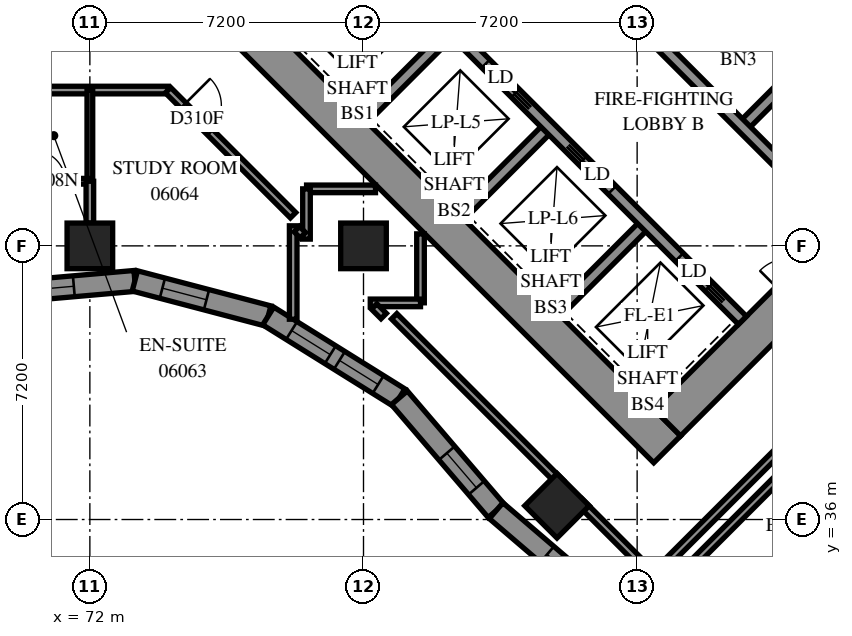
"""IFC4 building model, lengths in metres.
Left out: names, types, materials, properties, quantities, classifications, styles, units other than length and angle.
Written with IfcOpenShell. Run it as: python <this file> out.ifc"""

import sys

from ifc_helpers import new_model, si_unit, direction, frame, frame_2d, origin, origin_2d, place, context, subcontext, project, spatial, polyline, rectangle, outline, extrude, element, fill, save


model = new_model("IFC4")
c1 = context("Model", 3, precision=1e-05, world=origin(), true_north=direction((0.0, 1.0)))
c2 = subcontext(c1, "Body", "Model", "MODEL_VIEW")
j1 = project(units=[si_unit("LENGTHUNIT", "METRE"), si_unit("PLANEANGLEUNIT", "RADIAN")], contexts=[c1])
p1 = place(None, origin())
s1 = spatial("IfcSite", under=j1, at=p1, CompositionType="ELEMENT")
p2 = place(p1, origin())
s2 = spatial("IfcBuilding", under=s1, at=p2, CompositionType="ELEMENT")
p3 = place(p2, frame((0.0, 0.0, 27.0)))
s3 = spatial("IfcBuildingStorey", under=s2, at=p3, CompositionType="ELEMENT", Elevation=27.0)
for number, where, z_axis, x_axis in (
    (1, (72.0, 43.2, 0.0), (0.0, 0.0, 1.0), (1.0, 0.0, 0.0)),
    (2, (79.2, 43.2, 0.0), (0.0, 0.0, 1.0), (1.0, 0.0, 0.0)),
    (3, (84.291, 36.362, 0.0), (0.0, 0.0, 1.0), (0.707, -0.707, 0.0)),
):
    element("IfcColumn", number, at=place(p3, frame(where, z_axis=z_axis, x_axis=x_axis)), inside=s3, PredefinedType="COLUMN", context=c2, shape_type="SweptSolid", body=[
        extrude(rectangle(XDim=1.2, YDim=1.2, at=origin_2d()), origin(), (0.0, 0.0, 1.0), 3.1),
    ])
p4 = place(p3, frame((75.594, 49.443, -0.3), z_axis=(0.0, 0.0, 1.0), x_axis=(0.7071037324, -0.70710983, 0.0)))
e4 = element("IfcWall", 4, at=p4, inside=s3, PredefinedType="SHEAR", context=c2, shape_type="SweptSolid", body=[
    extrude(rectangle(XDim=16.4, YDim=1.0, at=frame_2d((8.2, 0.0))), origin(), (0.0, 0.0, 1.0), 2.7),
])
p5 = place(p3, frame((87.19, 38.554, -0.3), z_axis=(0.0, 0.0, 1.0), x_axis=(0.707103309, 0.7071102534, 0.0)))
e5 = element("IfcWall", 5, at=p5, inside=s3, PredefinedType="SHEAR", context=c2, shape_type="SweptSolid", body=[
    extrude(rectangle(XDim=14.4, YDim=1.0, at=frame_2d((7.2, 0.0))), origin(), (0.0, 0.0, 1.0), 2.7),
])
p6 = place(p5, frame((4.55, 0.0, 0.3)))
e6 = element("IfcOpeningElement", 6, at=p6, cuts=e5, PredefinedType="OPENING", context=c2, shape_type="SweptSolid", body=[
    extrude(rectangle(XDim=1.1, YDim=2.1, at=frame_2d((0.55, 1.05))), frame((0.0, 0.51, 0.0), z_axis=(0.0, -1.0, 0.0), x_axis=(1.0, 0.0, 0.0)), (0.0, 0.0, 1.0), 1.02),
])
p7 = place(p5, frame((11.35, 0.0, 0.3)))
e7 = element("IfcOpeningElement", 7, at=p7, cuts=e5, PredefinedType="OPENING", context=c2, shape_type="SweptSolid", body=[
    extrude(rectangle(XDim=1.1, YDim=2.1, at=frame_2d((0.55, 1.05))), frame((0.0, 0.51, 0.0), z_axis=(0.0, -1.0, 0.0), x_axis=(1.0, 0.0, 0.0)), (0.0, 0.0, 1.0), 1.02),
])
p8 = place(p3, frame((79.2, 46.544, 0.0), z_axis=(0.0, 0.0, 1.0), x_axis=(0.7071219326, 0.7070916295, 0.0)))
e8 = element("IfcWall", 8, at=p8, inside=s3, PredefinedType="SOLIDWALL", context=c2, shape_type="SweptSolid", body=[
    extrude(rectangle(XDim=3.3, YDim=0.3, at=frame_2d((1.65, 0.0))), origin(), (0.0, 0.0, 1.0), 3.1),
])
for number, where, z_axis, x_axis in (
    (9, (81.746, 43.999, 0.0), (0.0, 0.0, 1.0), (0.707, 0.707, 0.0)),
    (10, (84.291, 41.453, 0.0), (0.0, 0.0, 1.0), (0.707, 0.707, 0.0)),
):
    element("IfcWall", number, at=place(p3, frame(where, z_axis=z_axis, x_axis=x_axis)), inside=s3, PredefinedType="SOLIDWALL", context=c2, shape_type="SweptSolid", body=[
        extrude(rectangle(XDim=3.3, YDim=0.3, at=frame_2d((1.65, 0.0))), origin(), (0.0, 0.0, 1.0), 3.1),
    ])
p9 = place(p3, frame((89.17, 46.332, 0.0), z_axis=(0.0, 0.0, 1.0), x_axis=(0.7071067812, 0.7071067812, 0.0)))
e11 = element("IfcWall", 11, at=p9, inside=s3, PredefinedType="SOLIDWALL", context=c2, shape_type="SweptSolid", body=[
    extrude(rectangle(XDim=3.3, YDim=0.3, at=frame_2d((1.65, 0.0))), origin(), (0.0, 0.0, 1.0), 3.1),
])
p10 = place(p3, frame((78.988, 51.423, 0.0), z_axis=(0.0, 0.0, 1.0), x_axis=(0.7071067812, -0.7071067812, 0.0)))
e12 = element("IfcWall", 12, at=p10, inside=s3, PredefinedType="SOLIDWALL", context=c2, shape_type="SweptSolid", body=[
    extrude(rectangle(XDim=14.4, YDim=0.3, at=frame_2d((7.2, 0.0))), origin(), (0.0, 0.0, 1.0), 3.1),
])
p11 = place(p10, frame((1.25, 0.0, 0.0)))
e13 = element("IfcOpeningElement", 13, at=p11, cuts=e12, PredefinedType="OPENING", context=c2, shape_type="SweptSolid", body=[
    extrude(rectangle(XDim=1.1, YDim=2.1, at=frame_2d((0.55, 1.05))), frame((0.0, 0.16, 0.0), z_axis=(0.0, -1.0, 0.0), x_axis=(1.0, 0.0, 0.0)), (0.0, 0.0, 1.0), 0.32),
])
p12 = place(p10, frame((4.85, 0.0, 0.0)))
e14 = element("IfcOpeningElement", 14, at=p12, cuts=e12, PredefinedType="OPENING", context=c2, shape_type="SweptSolid", body=[
    extrude(rectangle(XDim=1.1, YDim=2.1, at=frame_2d((0.55, 1.05))), frame((0.0, 0.16, 0.0), z_axis=(0.0, -1.0, 0.0), x_axis=(1.0, 0.0, 0.0)), (0.0, 0.0, 1.0), 0.32),
])
p13 = place(p10, frame((8.45, 0.0, 0.0)))
e15 = element("IfcOpeningElement", 15, at=p13, cuts=e12, PredefinedType="OPENING", context=c2, shape_type="SweptSolid", body=[
    extrude(rectangle(XDim=1.1, YDim=2.1, at=frame_2d((0.55, 1.05))), frame((0.0, 0.16, 0.0), z_axis=(0.0, -1.0, 0.0), x_axis=(1.0, 0.0, 0.0)), (0.0, 0.0, 1.0), 0.32),
])
p14 = place(p10, frame((12.05, 0.0, 0.0)))
e16 = element("IfcOpeningElement", 16, at=p14, cuts=e12, PredefinedType="OPENING", context=c2, shape_type="SweptSolid", body=[
    extrude(rectangle(XDim=1.1, YDim=2.1, at=frame_2d((0.55, 1.05))), frame((0.0, 0.16, 0.0), z_axis=(0.0, -1.0, 0.0), x_axis=(1.0, 0.0, 0.0)), (0.0, 0.0, 1.0), 0.32),
])
p15 = place(p3, frame((81.534, 53.969, 0.0), z_axis=(0.0, 0.0, 1.0), x_axis=(0.707103309, -0.7071102534, 0.0)))
e17 = element("IfcWall", 17, at=p15, inside=s3, PredefinedType="SOLIDWALL", context=c2, shape_type="SweptSolid", body=[
    extrude(rectangle(XDim=14.4, YDim=0.3, at=frame_2d((7.2, 0.0))), origin(), (0.0, 0.0, 1.0), 3.1),
])
p16 = place(p15, frame((12.05, 0.0, 0.0)))
e18 = element("IfcOpeningElement", 18, at=p16, cuts=e17, PredefinedType="OPENING", context=c2, shape_type="SweptSolid", body=[
    extrude(rectangle(XDim=1.1, YDim=2.1, at=frame_2d((0.55, 1.05))), frame((0.0, 0.16, 0.0), z_axis=(0.0, -1.0, 0.0), x_axis=(1.0, 0.0, 0.0)), (0.0, 0.0, 1.0), 0.32),
])
p17 = place(p3, frame((88.958, 51.211, 0.0), z_axis=(0.0, 0.0, 1.0), x_axis=(0.7070998367, -0.7071137256, 0.0)))
e19 = element("IfcWall", 19, at=p17, inside=s3, PredefinedType="SOLIDWALL", context=c2, shape_type="SweptSolid", body=[
    extrude(rectangle(XDim=7.2, YDim=0.3, at=frame_2d((3.6, 0.0))), origin(), (0.0, 0.0, 1.0), 3.1),
])
p18 = place(p3, frame((69.737, 41.976, 0.0), z_axis=(0.0, 0.0, 1.0), x_axis=(0.9961831061, 0.0872881385, 0.0)))
e20 = element("IfcWall", 20, at=p18, inside=s3, PredefinedType="SOLIDWALL", context=c2, shape_type="SweptSolid", body=[
    extrude(outline(polyline([(-0.024, -0.275), (3.412, -0.275), (3.508, 0.275), (0.024, 0.275), (-0.024, -0.275)])), origin(), (0.0, 0.0, 1.0), 3.1),
])
p19 = place(p18, frame((0.648, 0.0, 0.5)))
e21 = element("IfcOpeningElement", 21, at=p19, cuts=e20, PredefinedType="OPENING", context=c2, shape_type="SweptSolid", body=[
    extrude(rectangle(XDim=1.2, YDim=2.45, at=frame_2d((0.6, 1.225))), frame((0.0, 0.285, 0.0), z_axis=(0.0, -1.0, 0.0), x_axis=(1.0, 0.0, 0.0)), (0.0, 0.0, 1.0), 0.57),
])
p20 = place(p3, frame((73.184, 42.278, 0.0), z_axis=(0.0, 0.0, 1.0), x_axis=(0.9671305585, -0.2542803232, 0.0)))
e22 = element("IfcWall", 22, at=p20, inside=s3, PredefinedType="SOLIDWALL", context=c2, shape_type="SweptSolid", body=[
    extrude(outline(polyline([(0.048, -0.275), (3.587, -0.275), (3.67, 0.275), (-0.048, 0.275), (0.048, -0.275)])), origin(), (0.0, 0.0, 1.0), 3.1),
])
p21 = place(p20, frame((0.749, 0.0, 0.5)))
e23 = element("IfcOpeningElement", 23, at=p21, cuts=e22, PredefinedType="OPENING", context=c2, shape_type="SweptSolid", body=[
    extrude(rectangle(XDim=1.2, YDim=2.45, at=frame_2d((0.6, 1.225))), frame((0.0, 0.285, 0.0), z_axis=(0.0, -1.0, 0.0), x_axis=(1.0, 0.0, 0.0)), (0.0, 0.0, 1.0), 0.57),
])
p22 = place(p3, frame((76.693, 41.355, 0.0), z_axis=(0.0, 0.0, 1.0), x_axis=(0.8485945184, -0.5290438009, 0.0)))
e24 = element("IfcWall", 24, at=p22, inside=s3, PredefinedType="SOLIDWALL", context=c2, shape_type="SweptSolid", body=[
    extrude(outline(polyline([(0.042, -0.275), (4.025, -0.275), (4.109, 0.275), (-0.042, 0.275), (0.042, -0.275)])), origin(), (0.0, 0.0, 1.0), 3.1),
])
p23 = place(p22, frame((0.724, 0.0, 0.5)))
e25 = element("IfcOpeningElement", 25, at=p23, cuts=e24, PredefinedType="OPENING", context=c2, shape_type="SweptSolid", body=[
    extrude(rectangle(XDim=1.2, YDim=2.45, at=frame_2d((0.6, 1.225))), frame((0.0, 0.285, 0.0), z_axis=(0.0, -1.0, 0.0), x_axis=(1.0, 0.0, 0.0)), (0.0, 0.0, 1.0), 0.57),
])
p24 = place(p22, frame((2.208, 0.0, 0.5)))
e26 = element("IfcOpeningElement", 26, at=p24, cuts=e24, PredefinedType="OPENING", context=c2, shape_type="SweptSolid", body=[
    extrude(rectangle(XDim=1.2, YDim=2.45, at=frame_2d((0.6, 1.225))), frame((0.0, 0.285, 0.0), z_axis=(0.0, -1.0, 0.0), x_axis=(1.0, 0.0, 0.0)), (0.0, 0.0, 1.0), 0.57),
])
p25 = place(p3, frame((80.144, 39.204, 0.0), z_axis=(0.0, 0.0, 1.0), x_axis=(0.6504882403, -0.7595163258, 0.0)))
e27 = element("IfcWall", 27, at=p25, inside=s3, PredefinedType="SOLIDWALL", context=c2, shape_type="SweptSolid", body=[
    extrude(outline(polyline([(0.042, -0.275), (3.934, -0.275), (3.891, 0.275), (-0.042, 0.275), (0.042, -0.275)])), origin(), (0.0, 0.0, 1.0), 3.1),
])
p26 = place(p25, frame((1.919, 0.0, 0.5)))
e28 = element("IfcOpeningElement", 28, at=p26, cuts=e27, PredefinedType="OPENING", context=c2, shape_type="SweptSolid", body=[
    extrude(rectangle(XDim=1.2, YDim=2.45, at=frame_2d((0.6, 1.225))), frame((0.0, 0.285, 0.0), z_axis=(0.0, -1.0, 0.0), x_axis=(1.0, 0.0, 0.0)), (0.0, 0.0, 1.0), 0.57),
])
p27 = place(p3, frame((82.69, 36.232, 0.0), z_axis=(0.0, 0.0, 1.0), x_axis=(0.7595050452, -0.6505014115, 0.0)))
e29 = element("IfcWall", 29, at=p27, inside=s3, PredefinedType="SOLIDWALL", context=c2, shape_type="SweptSolid", body=[
    extrude(outline(polyline([(-0.021, -0.275), (3.87, -0.275), (3.913, 0.275), (0.021, 0.275), (-0.021, -0.275)])), origin(), (0.0, 0.0, 1.0), 3.1),
])
p28 = place(p27, frame((1.768, 0.0, 0.5)))
e30 = element("IfcOpeningElement", 30, at=p28, cuts=e29, PredefinedType="OPENING", context=c2, shape_type="SweptSolid", body=[
    extrude(rectangle(XDim=1.2, YDim=2.45, at=frame_2d((0.6, 1.225))), frame((0.0, 0.285, 0.0), z_axis=(0.0, -1.0, 0.0), x_axis=(1.0, 0.0, 0.0)), (0.0, 0.0, 1.0), 0.57),
])
p29 = place(p3, frame((54.5, 47.3, 0.0), z_axis=(0.0, 0.0, 1.0), x_axis=(1.0, 0.0, 0.0)))
e31 = element("IfcWall", 31, at=p29, inside=s3, PredefinedType="PARTITIONING", context=c2, shape_type="SweptSolid", body=[
    extrude(rectangle(XDim=19.56, YDim=0.2, at=frame_2d((9.78, 0.0))), origin(), (0.0, 0.0, 1.0), 3.1),
])
p30 = place(p29, frame((0.243, 0.0, 0.0)))
e32 = element("IfcOpeningElement", 32, at=p30, cuts=e31, PredefinedType="OPENING", context=c2, shape_type="SweptSolid", body=[
    extrude(rectangle(XDim=1.0, YDim=2.1, at=frame_2d((0.5, 1.05))), frame((0.0, 0.11, 0.0), z_axis=(0.0, -1.0, 0.0), x_axis=(1.0, 0.0, 0.0)), (0.0, 0.0, 1.0), 0.22),
])
p31 = place(p29, frame((5.4, 0.0, 0.0)))
e33 = element("IfcOpeningElement", 33, at=p31, cuts=e31, PredefinedType="OPENING", context=c2, shape_type="SweptSolid", body=[
    extrude(rectangle(XDim=0.9, YDim=2.1, at=frame_2d((0.45, 1.05))), frame((0.0, 0.11, 0.0), z_axis=(0.0, -1.0, 0.0), x_axis=(1.0, 0.0, 0.0)), (0.0, 0.0, 1.0), 0.22),
])
p32 = place(p29, frame((7.1, 0.0, 0.0)))
e34 = element("IfcOpeningElement", 34, at=p32, cuts=e31, PredefinedType="OPENING", context=c2, shape_type="SweptSolid", body=[
    extrude(rectangle(XDim=0.9, YDim=2.1, at=frame_2d((0.45, 1.05))), frame((0.0, 0.11, 0.0), z_axis=(0.0, -1.0, 0.0), x_axis=(1.0, 0.0, 0.0)), (0.0, 0.0, 1.0), 0.22),
])
p33 = place(p29, frame((12.6, 0.0, 0.0)))
e35 = element("IfcOpeningElement", 35, at=p33, cuts=e31, PredefinedType="OPENING", context=c2, shape_type="SweptSolid", body=[
    extrude(rectangle(XDim=0.9, YDim=2.1, at=frame_2d((0.45, 1.05))), frame((0.0, 0.11, 0.0), z_axis=(0.0, -1.0, 0.0), x_axis=(1.0, 0.0, 0.0)), (0.0, 0.0, 1.0), 0.22),
])
p34 = place(p29, frame((14.3, 0.0, 0.0)))
e36 = element("IfcOpeningElement", 36, at=p34, cuts=e31, PredefinedType="OPENING", context=c2, shape_type="SweptSolid", body=[
    extrude(rectangle(XDim=0.9, YDim=2.1, at=frame_2d((0.45, 1.05))), frame((0.0, 0.11, 0.0), z_axis=(0.0, -1.0, 0.0), x_axis=(1.0, 0.0, 0.0)), (0.0, 0.0, 1.0), 0.22),
])
p35 = place(p3, frame((86.838, 34.522, 0.0), z_axis=(0.0, 0.0, 1.0), x_axis=(0.7072154749, 0.7069980708, 0.0)))
e37 = element("IfcWall", 37, at=p35, inside=s3, PredefinedType="PARTITIONING", context=c2, shape_type="SweptSolid", body=[
    extrude(rectangle(XDim=9.2, YDim=0.2, at=frame_2d((4.6, 0.0))), origin(), (0.0, 0.0, 1.0), 3.1),
])
p36 = place(p3, frame((86.339, 33.313, 0.0), z_axis=(0.0, 0.0, 1.0), x_axis=(0.7069756325, 0.7072379055, 0.0)))
e38 = element("IfcWall", 38, at=p36, inside=s3, PredefinedType="PARTITIONING", context=c2, shape_type="SweptSolid", body=[
    extrude(rectangle(XDim=8.007, YDim=0.2, at=frame_2d((4.003, 0.0))), origin(), (0.0, 0.0, 1.0), 3.1),
])
p37 = place(p3, frame((80.007, 41.347, 0.0), z_axis=(0.0, 0.0, 1.0), x_axis=(0.7071067812, -0.7071067812, 0.0)))
e39 = element("IfcWall", 39, at=p37, inside=s3, PredefinedType="PARTITIONING", context=c2, shape_type="SweptSolid", body=[
    extrude(rectangle(XDim=6.206, YDim=0.2, at=frame_2d((3.103, 0.0))), origin(), (0.0, 0.0, 1.0), 3.1),
])
p38 = place(p3, frame((89.981, 31.871, 0.0), z_axis=(0.0, 0.0, 1.0), x_axis=(0.7071067812, 0.7071067812, 0.0)))
e40 = element("IfcWall", 40, at=p38, inside=s3, PredefinedType="PARTITIONING", context=c2, shape_type="SweptSolid", body=[
    extrude(rectangle(XDim=5.504, YDim=0.2, at=frame_2d((2.752, 0.0))), origin(), (0.0, 0.0, 1.0), 3.1),
])
p39 = place(p3, frame((74.057, 47.297, 0.0), z_axis=(0.0, 0.0, 1.0), x_axis=(0.7071067812, -0.7071067812, 0.0)))
e41 = element("IfcWall", 41, at=p39, inside=s3, PredefinedType="PARTITIONING", context=c2, shape_type="SweptSolid", body=[
    extrude(rectangle(XDim=4.653, YDim=0.2, at=frame_2d((2.326, 0.0))), origin(), (0.0, 0.0, 1.0), 3.1),
])
p40 = place(p39, frame((0.57, 0.0, 0.0)))
e42 = element("IfcOpeningElement", 42, at=p40, cuts=e41, PredefinedType="OPENING", context=c2, shape_type="SweptSolid", body=[
    extrude(rectangle(XDim=1.0, YDim=2.1, at=frame_2d((0.5, 1.05))), frame((0.0, 0.11, 0.0), z_axis=(0.0, -1.0, 0.0), x_axis=(1.0, 0.0, 0.0)), (0.0, 0.0, 1.0), 0.22),
])
p41 = place(p3, frame((84.889, 36.465, 0.0), z_axis=(0.0, 0.0, 1.0), x_axis=(0.7071067812, -0.7071067812, 0.0)))
e43 = element("IfcWall", 43, at=p41, inside=s3, PredefinedType="PARTITIONING", context=c2, shape_type="SweptSolid", body=[
    extrude(rectangle(XDim=2.749, YDim=0.2, at=frame_2d((1.375, 0.0))), origin(), (0.0, 0.0, 1.0), 3.1),
])
p42 = place(p3, frame((77.35, 41.27, 0.0), z_axis=(0.0, 0.0, 1.0), x_axis=(0.0, 1.0, 0.0)))
e44 = element("IfcWall", 44, at=p42, inside=s3, PredefinedType="PARTITIONING", context=c2, shape_type="SweptSolid", body=[
    extrude(rectangle(XDim=2.458, YDim=0.2, at=frame_2d((1.229, 0.0))), origin(), (0.0, 0.0, 1.0), 3.1),
])
p43 = place(p3, frame((72.0, 44.9, 0.0), z_axis=(0.0, 0.0, 1.0), x_axis=(0.0, 1.0, 0.0)))
e45 = element("IfcWall", 45, at=p43, inside=s3, PredefinedType="PARTITIONING", context=c2, shape_type="SweptSolid", body=[
    extrude(rectangle(XDim=2.4, YDim=0.15, at=frame_2d((1.2, 0.0))), origin(), (0.0, 0.0, 1.0), 3.1),
])
p44 = place(p3, frame((70.1, 44.9, 0.0), z_axis=(0.0, 0.0, 1.0), x_axis=(1.0, 0.0, 0.0)))
e46 = element("IfcWall", 46, at=p44, inside=s3, PredefinedType="PARTITIONING", context=c2, shape_type="SweptSolid", body=[
    extrude(rectangle(XDim=1.9, YDim=0.15, at=frame_2d((0.95, 0.0))), origin(), (0.0, 0.0, 1.0), 3.1),
])
p45 = place(p44, frame((0.448, 0.0, 0.0)))
e47 = element("IfcOpeningElement", 47, at=p45, cuts=e46, PredefinedType="OPENING", context=c2, shape_type="SweptSolid", body=[
    extrude(rectangle(XDim=0.8, YDim=2.1, at=frame_2d((0.4, 1.05))), frame((0.0, 0.085, 0.0), z_axis=(0.0, -1.0, 0.0), x_axis=(1.0, 0.0, 0.0)), (0.0, 0.0, 1.0), 0.17),
])
for number, where, z_axis, x_axis in (
    (48, (77.702, 44.7, 0.0), (0.0, 0.0, 1.0), (1.0, 0.0, 0.0)),
    (49, (80.7, 41.702, 0.0), (0.0, 0.0, 1.0), (0.0, 1.0, 0.0)),
):
    element("IfcWall", number, at=place(p3, frame(where, z_axis=z_axis, x_axis=x_axis)), inside=s3, PredefinedType="PARTITIONING", context=c2, shape_type="SweptSolid", body=[
        extrude(rectangle(XDim=1.814, YDim=0.2, at=frame_2d((0.907, 0.0))), origin(), (0.0, 0.0, 1.0), 3.1),
    ])
for number, where, z_axis, x_axis in (
    (50, (77.7, 43.378, 0.0), (0.0, 0.0, 1.0), (0.0, 1.0, 0.0)),
    (51, (79.378, 41.7, 0.0), (0.0, 0.0, 1.0), (1.0, 0.0, 0.0)),
):
    element("IfcWall", number, at=place(p3, frame(where, z_axis=z_axis, x_axis=x_axis)), inside=s3, PredefinedType="PARTITIONING", context=c2, shape_type="SweptSolid", body=[
        extrude(rectangle(XDim=1.322, YDim=0.2, at=frame_2d((0.661, 0.0))), origin(), (0.0, 0.0, 1.0), 3.1),
    ])
p46 = place(p3, frame((72.0, 43.8, 0.0), z_axis=(0.0, 0.0, 1.0), x_axis=(0.0, 1.0, 0.0)))
e52 = element("IfcWall", 52, at=p46, inside=s3, PredefinedType="PARTITIONING", context=c2, shape_type="SweptSolid", body=[
    extrude(rectangle(XDim=1.1, YDim=0.2, at=frame_2d((0.55, 0.0))), origin(), (0.0, 0.0, 1.0), 3.1),
])
p47 = place(p3, frame((77.445, 43.64, 0.0), z_axis=(0.0, 0.0, 1.0), x_axis=(0.7071067812, -0.7071067812, 0.0)))
e53 = element("IfcWall", 53, at=p47, inside=s3, PredefinedType="PARTITIONING", context=c2, shape_type="SweptSolid", body=[
    extrude(rectangle(XDim=0.225, YDim=0.2, at=frame_2d((0.113, 0.0))), origin(), (0.0, 0.0, 1.0), 3.1),
])
p48 = place(p3, frame((79.481, 41.605, 0.0), z_axis=(0.0, 0.0, 1.0), x_axis=(0.7071067812, -0.7071067812, 0.0)))
e54 = element("IfcWall", 54, at=p48, inside=s3, PredefinedType="PARTITIONING", context=c2, shape_type="SweptSolid", body=[
    extrude(rectangle(XDim=0.355, YDim=0.2, at=frame_2d((0.177, 0.0))), origin(), (0.0, 0.0, 1.0), 3.1),
])
p49 = place(p19, origin())
e55 = element("IfcWindow", 55, at=p49, inside=s3, PartitioningType="SINGLE_PANEL", PredefinedType="WINDOW", context=c2, shape_type="SweptSolid", body=[
    extrude(rectangle(XDim=1.2, YDim=2.45, at=frame_2d((0.6, 1.225))), frame((0.0, 0.155, 0.0), z_axis=(0.0, -1.0, 0.0), x_axis=(1.0, 0.0, 0.0)), (0.0, 0.0, 1.0), 0.06),
])
fill(e21, e55)
p50 = place(p21, origin())
e56 = element("IfcWindow", 56, at=p50, inside=s3, PartitioningType="SINGLE_PANEL", PredefinedType="WINDOW", context=c2, shape_type="SweptSolid", body=[
    extrude(rectangle(XDim=1.2, YDim=2.45, at=frame_2d((0.6, 1.225))), frame((0.0, 0.155, 0.0), z_axis=(0.0, -1.0, 0.0), x_axis=(1.0, 0.0, 0.0)), (0.0, 0.0, 1.0), 0.06),
])
fill(e23, e56)
p51 = place(p23, origin())
e57 = element("IfcWindow", 57, at=p51, inside=s3, PartitioningType="SINGLE_PANEL", PredefinedType="WINDOW", context=c2, shape_type="SweptSolid", body=[
    extrude(rectangle(XDim=1.2, YDim=2.45, at=frame_2d((0.6, 1.225))), frame((0.0, 0.155, 0.0), z_axis=(0.0, -1.0, 0.0), x_axis=(1.0, 0.0, 0.0)), (0.0, 0.0, 1.0), 0.06),
])
fill(e25, e57)
p52 = place(p24, origin())
e58 = element("IfcWindow", 58, at=p52, inside=s3, PartitioningType="SINGLE_PANEL", PredefinedType="WINDOW", context=c2, shape_type="SweptSolid", body=[
    extrude(rectangle(XDim=1.2, YDim=2.45, at=frame_2d((0.6, 1.225))), frame((0.0, 0.155, 0.0), z_axis=(0.0, -1.0, 0.0), x_axis=(1.0, 0.0, 0.0)), (0.0, 0.0, 1.0), 0.06),
])
fill(e26, e58)
p53 = place(p26, origin())
e59 = element("IfcWindow", 59, at=p53, inside=s3, PartitioningType="SINGLE_PANEL", PredefinedType="WINDOW", context=c2, shape_type="SweptSolid", body=[
    extrude(rectangle(XDim=1.2, YDim=2.45, at=frame_2d((0.6, 1.225))), frame((0.0, 0.155, 0.0), z_axis=(0.0, -1.0, 0.0), x_axis=(1.0, 0.0, 0.0)), (0.0, 0.0, 1.0), 0.06),
])
fill(e28, e59)
p54 = place(p28, origin())
e60 = element("IfcWindow", 60, at=p54, inside=s3, PartitioningType="SINGLE_PANEL", PredefinedType="WINDOW", context=c2, shape_type="SweptSolid", body=[
    extrude(rectangle(XDim=1.2, YDim=2.45, at=frame_2d((0.6, 1.225))), frame((0.0, 0.155, 0.0), z_axis=(0.0, -1.0, 0.0), x_axis=(1.0, 0.0, 0.0)), (0.0, 0.0, 1.0), 0.06),
])
fill(e30, e60)
p55 = place(p12, origin())
e61 = element("IfcDoor", 61, at=p55, inside=s3, OperationType="SLIDING_TO_RIGHT", PredefinedType="DOOR", context=c2, shape_type="SweptSolid", body=[
    extrude(rectangle(XDim=1.1, YDim=2.1, at=frame_2d((0.55, 1.05))), frame((0.0, 0.025, 0.0), z_axis=(0.0, -1.0, 0.0), x_axis=(1.0, 0.0, 0.0)), (0.0, 0.0, 1.0), 0.05),
])
fill(e14, e61)
p56 = place(p13, origin())
e62 = element("IfcDoor", 62, at=p56, inside=s3, OperationType="SLIDING_TO_LEFT", PredefinedType="DOOR", context=c2, shape_type="SweptSolid", body=[
    extrude(rectangle(XDim=1.1, YDim=2.1, at=frame_2d((0.55, 1.05))), frame((0.0, 0.025, 0.0), z_axis=(0.0, -1.0, 0.0), x_axis=(1.0, 0.0, 0.0)), (0.0, 0.0, 1.0), 0.05),
])
fill(e15, e62)
p57 = place(p14, origin())
e63 = element("IfcDoor", 63, at=p57, inside=s3, OperationType="SLIDING_TO_RIGHT", PredefinedType="DOOR", context=c2, shape_type="SweptSolid", body=[
    extrude(rectangle(XDim=1.1, YDim=2.1, at=frame_2d((0.55, 1.05))), frame((0.0, 0.025, 0.0), z_axis=(0.0, -1.0, 0.0), x_axis=(1.0, 0.0, 0.0)), (0.0, 0.0, 1.0), 0.05),
])
fill(e16, e63)
p58 = place(p45, origin())
e64 = element("IfcDoor", 64, at=p58, inside=s3, OperationType="SINGLE_SWING_RIGHT", PredefinedType="DOOR", context=c2, shape_type="SweptSolid", body=[
    extrude(rectangle(XDim=0.8, YDim=2.1, at=frame_2d((0.4, 1.05))), frame((0.0, 0.025, 0.0), z_axis=(0.0, -1.0, 0.0), x_axis=(1.0, 0.0, 0.0)), (0.0, 0.0, 1.0), 0.05),
])
fill(e47, e64)
p59 = place(p40, origin())
e65 = element("IfcDoor", 65, at=p59, inside=s3, OperationType="SINGLE_SWING_LEFT", PredefinedType="DOOR", context=c2, shape_type="SweptSolid", body=[
    extrude(rectangle(XDim=1.0, YDim=2.1, at=frame_2d((0.5, 1.05))), frame((0.0, 0.025, 0.0), z_axis=(0.0, -1.0, 0.0), x_axis=(1.0, 0.0, 0.0)), (0.0, 0.0, 1.0), 0.05),
])
fill(e42, e65)
save(model, sys.argv[1])
